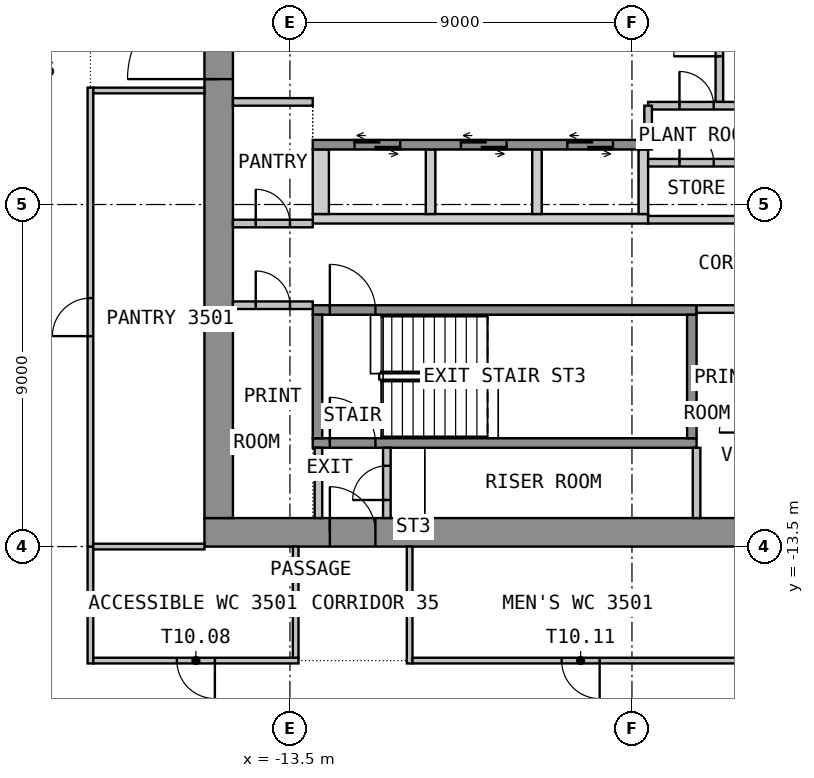
"""IFC4 building model, lengths in metres.
Left out: names, types, materials, properties, quantities, classifications, styles, units other than length and angle.
Written with IfcOpenShell. Run it as: python <this file> out.ifc"""

import sys

from ifc_helpers import new_model, si_unit, direction, frame, frame_2d, origin, place, context, subcontext, project, spatial, polyline, rectangle, outline, extrude, element, fill, save


model = new_model("IFC4")
c1 = context("Model", 3, precision=1e-05, world=origin(), true_north=direction((0.0, 1.0)))
c2 = subcontext(c1, "Body", "Model", "MODEL_VIEW")
j1 = project(units=[si_unit("LENGTHUNIT", "METRE"), si_unit("PLANEANGLEUNIT", "RADIAN")], contexts=[c1])
p1 = place(None, origin())
s1 = spatial("IfcSite", under=j1, at=p1, CompositionType="ELEMENT")
p2 = place(p1, origin())
s2 = spatial("IfcBuilding", under=s1, at=p2, CompositionType="ELEMENT")
p3 = place(p2, frame((0.0, 0.0, 144.3)))
s3 = spatial("IfcBuildingStorey", under=s2, at=p3, CompositionType="ELEMENT", Elevation=144.3)
p4 = place(p3, frame((-15.75, -13.125, 0.0), z_axis=(0.0, 0.0, 1.0), x_axis=(1.0, 0.0, 0.0)))
e1 = element("IfcWall", 1, at=p4, inside=s3, PredefinedType="SHEAR", context=c2, shape_type="SweptSolid", body=[
    extrude(rectangle(XDim=31.5, YDim=0.75, at=frame_2d((15.75, 0.0))), origin(), (0.0, 0.0, 1.0), 3.575),
])
p5 = place(p4, frame((14.55, 0.0, 0.0)))
e2 = element("IfcOpeningElement", 2, at=p5, cuts=e1, PredefinedType="OPENING", context=c2, shape_type="SweptSolid", body=[
    extrude(rectangle(XDim=2.4, YDim=2.1, at=frame_2d((1.2, 1.05))), frame((0.0, 0.385, 0.0), z_axis=(0.0, -1.0, 0.0), x_axis=(1.0, 0.0, 0.0)), (0.0, 0.0, 1.0), 0.77),
])
p6 = place(p4, frame((3.3, 0.0, 0.0)))
e3 = element("IfcOpeningElement", 3, at=p6, cuts=e1, PredefinedType="OPENING", context=c2, shape_type="SweptSolid", body=[
    extrude(rectangle(XDim=1.2, YDim=2.1, at=frame_2d((0.6, 1.05))), frame((0.0, 0.385, 0.0), z_axis=(0.0, -1.0, 0.0), x_axis=(1.0, 0.0, 0.0)), (0.0, 0.0, 1.0), 0.77),
])
p7 = place(p4, frame((27.0, 0.0, 0.0)))
e4 = element("IfcOpeningElement", 4, at=p7, cuts=e1, PredefinedType="OPENING", context=c2, shape_type="SweptSolid", body=[
    extrude(rectangle(XDim=1.2, YDim=2.1, at=frame_2d((0.6, 1.05))), frame((0.0, 0.385, 0.0), z_axis=(0.0, -1.0, 0.0), x_axis=(1.0, 0.0, 0.0)), (0.0, 0.0, 1.0), 0.77),
])
p8 = place(p3, frame((-15.375, -12.75, 0.0), z_axis=(0.0, 0.0, 1.0), x_axis=(0.0, 1.0, 0.0)))
e5 = element("IfcWall", 5, at=p8, inside=s3, PredefinedType="SHEAR", context=c2, shape_type="SweptSolid", body=[
    extrude(rectangle(XDim=25.5, YDim=0.75, at=frame_2d((12.75, 0.0))), origin(), (0.0, 0.0, 1.0), 3.575),
])
p9 = place(p8, frame((11.55, 0.0, 0.0)))
e6 = element("IfcOpeningElement", 6, at=p9, cuts=e5, PredefinedType="OPENING", context=c2, shape_type="SweptSolid", body=[
    extrude(rectangle(XDim=2.4, YDim=2.1, at=frame_2d((1.2, 1.05))), frame((0.0, 0.385, 0.0), z_axis=(0.0, -1.0, 0.0), x_axis=(1.0, 0.0, 0.0)), (0.0, 0.0, 1.0), 0.77),
])
p10 = place(p3, origin())
e7 = element("IfcWall", 7, at=p10, inside=s3, PredefinedType="SHEAR", context=c2, shape_type="SweptSolid", body=[
    extrude(outline(polyline([(-12.9, -5.0), (-4.075, -5.0), (-4.075, -4.75), (-12.9, -4.75), (-12.9, -5.0)])), origin(), (0.0, 0.0, 1.0), 3.575),
])
p11 = place(p3, origin())
e8 = element("IfcWall", 8, at=p11, inside=s3, PredefinedType="SHEAR", context=c2, shape_type="SweptSolid", body=[
    extrude(outline(polyline([(-12.9, -4.75), (-12.475, -4.75), (-12.475, -3.05), (-12.9, -3.05), (-12.9, -4.75)])), origin(), (0.0, 0.0, 1.0), 3.575),
])
p12 = place(p3, origin())
e9 = element("IfcWall", 9, at=p12, inside=s3, PredefinedType="SHEAR", context=c2, shape_type="SweptSolid", body=[
    extrude(outline(polyline([(-9.925, -4.75), (-9.675, -4.75), (-9.675, -3.05), (-9.925, -3.05), (-9.925, -4.75)])), origin(), (0.0, 0.0, 1.0), 3.575),
])
p13 = place(p3, origin())
e10 = element("IfcWall", 10, at=p13, inside=s3, PredefinedType="SHEAR", context=c2, shape_type="SweptSolid", body=[
    extrude(outline(polyline([(-7.125, -4.75), (-6.875, -4.75), (-6.875, -3.05), (-7.125, -3.05), (-7.125, -4.75)])), origin(), (0.0, 0.0, 1.0), 3.575),
])
p14 = place(p3, origin())
e11 = element("IfcWall", 11, at=p14, inside=s3, PredefinedType="SHEAR", context=c2, shape_type="SweptSolid", body=[
    extrude(outline(polyline([(-4.325, -4.75), (-4.075, -4.75), (-4.075, -3.05), (-4.325, -3.05), (-4.325, -4.75)])), origin(), (0.0, 0.0, 1.0), 3.575),
])
p15 = place(p3, frame((-12.9, -2.925, 0.0), z_axis=(0.0, 0.0, 1.0), x_axis=(1.0, 0.0, 0.0)))
e12 = element("IfcWall", 12, at=p15, inside=s3, PredefinedType="SHEAR", context=c2, shape_type="SweptSolid", body=[
    extrude(rectangle(XDim=8.825, YDim=0.25, at=frame_2d((4.413, 0.0))), origin(), (0.0, 0.0, 1.0), 3.575),
])
p16 = place(p15, frame((1.1, 0.0, 0.0)))
e13 = element("IfcOpeningElement", 13, at=p16, cuts=e12, PredefinedType="OPENING", context=c2, shape_type="SweptSolid", body=[
    extrude(rectangle(XDim=1.2, YDim=2.1, at=frame_2d((0.6, 1.05))), frame((0.0, 0.135, 0.0), z_axis=(0.0, -1.0, 0.0), x_axis=(1.0, 0.0, 0.0)), (0.0, 0.0, 1.0), 0.27),
])
p17 = place(p15, frame((3.9, 0.0, 0.0)))
e14 = element("IfcOpeningElement", 14, at=p17, cuts=e12, PredefinedType="OPENING", context=c2, shape_type="SweptSolid", body=[
    extrude(rectangle(XDim=1.2, YDim=2.1, at=frame_2d((0.6, 1.05))), frame((0.0, 0.135, 0.0), z_axis=(0.0, -1.0, 0.0), x_axis=(1.0, 0.0, 0.0)), (0.0, 0.0, 1.0), 0.27),
])
p18 = place(p15, frame((6.7, 0.0, 0.0)))
e15 = element("IfcOpeningElement", 15, at=p18, cuts=e12, PredefinedType="OPENING", context=c2, shape_type="SweptSolid", body=[
    extrude(rectangle(XDim=1.2, YDim=2.1, at=frame_2d((0.6, 1.05))), frame((0.0, 0.135, 0.0), z_axis=(0.0, -1.0, 0.0), x_axis=(1.0, 0.0, 0.0)), (0.0, 0.0, 1.0), 0.27),
])
p19 = place(p3, frame((-2.2, -1.8, 0.0), z_axis=(0.0, 0.0, 1.0), x_axis=(0.0, 1.0, 0.0)))
e16 = element("IfcWall", 16, at=p19, inside=s3, PredefinedType="PARTITIONING", context=c2, shape_type="SweptSolid", body=[
    extrude(rectangle(XDim=3.6, YDim=0.2, at=frame_2d((1.8, 0.0))), origin(), (0.0, 0.0, 1.0), 3.575),
])
p20 = place(p19, frame((1.2, 0.0, 0.0)))
e17 = element("IfcOpeningElement", 17, at=p20, cuts=e16, PredefinedType="OPENING", context=c2, shape_type="SweptSolid", body=[
    extrude(rectangle(XDim=1.2, YDim=2.1, at=frame_2d((0.6, 1.05))), frame((0.0, 0.11, 0.0), z_axis=(0.0, -1.0, 0.0), x_axis=(1.0, 0.0, 0.0)), (0.0, 0.0, 1.0), 0.22),
])
p21 = place(p3, frame((-12.9, -10.775, 0.0), z_axis=(0.0, 0.0, 1.0), x_axis=(1.0, 0.0, 0.0)))
e18 = element("IfcWall", 18, at=p21, inside=s3, PredefinedType="SHEAR", context=c2, shape_type="SweptSolid", body=[
    extrude(rectangle(XDim=10.1, YDim=0.25, at=frame_2d((5.05, 0.0))), origin(), (0.0, 0.0, 1.0), 3.575),
])
p22 = place(p21, frame((0.45, 0.0, 0.0)))
e19 = element("IfcOpeningElement", 19, at=p22, cuts=e18, PredefinedType="OPENING", context=c2, shape_type="SweptSolid", body=[
    extrude(rectangle(XDim=1.2, YDim=2.1, at=frame_2d((0.6, 1.05))), frame((0.0, 0.135, 0.0), z_axis=(0.0, -1.0, 0.0), x_axis=(1.0, 0.0, 0.0)), (0.0, 0.0, 1.0), 0.27),
])
p23 = place(p3, frame((-12.9, -7.275, 0.0), z_axis=(0.0, 0.0, 1.0), x_axis=(1.0, 0.0, 0.0)))
e20 = element("IfcWall", 20, at=p23, inside=s3, PredefinedType="SHEAR", context=c2, shape_type="SweptSolid", body=[
    extrude(rectangle(XDim=10.1, YDim=0.25, at=frame_2d((5.05, 0.0))), origin(), (0.0, 0.0, 1.0), 3.575),
])
p24 = place(p23, frame((0.45, 0.0, 0.0)))
e21 = element("IfcOpeningElement", 21, at=p24, cuts=e20, PredefinedType="OPENING", context=c2, shape_type="SweptSolid", body=[
    extrude(rectangle(XDim=1.2, YDim=2.1, at=frame_2d((0.6, 1.05))), frame((0.0, 0.135, 0.0), z_axis=(0.0, -1.0, 0.0), x_axis=(1.0, 0.0, 0.0)), (0.0, 0.0, 1.0), 0.27),
])
for number, where, z_axis, x_axis in (
    (22, (-12.775, -10.65, 0.0), (0.0, 0.0, 1.0), (0.0, 1.0, 0.0)),
    (23, (-2.925, -10.65, 0.0), (0.0, 0.0, 1.0), (0.0, 1.0, 0.0)),
):
    element("IfcWall", number, at=place(p3, frame(where, z_axis=z_axis, x_axis=x_axis)), inside=s3, PredefinedType="SHEAR", context=c2, shape_type="SweptSolid", body=[
        extrude(rectangle(XDim=3.25, YDim=0.25, at=frame_2d((1.625, 0.0))), origin(), (0.0, 0.0, 1.0), 3.575),
    ])
p25 = place(p3, frame((-2.8, -7.25, 0.0), z_axis=(0.0, 0.0, 1.0), x_axis=(1.0, 0.0, 0.0)))
e24 = element("IfcWall", 24, at=p25, inside=s3, PredefinedType="PARTITIONING", context=c2, shape_type="SweptSolid", body=[
    extrude(rectangle(XDim=1.4, YDim=0.2, at=frame_2d((0.7, 0.0))), origin(), (0.0, 0.0, 1.0), 3.575),
])
p26 = place(p3, frame((-12.75, -12.75, 0.0), z_axis=(0.0, 0.0, 1.0), x_axis=(0.0, 1.0, 0.0)))
e25 = element("IfcWall", 25, at=p26, inside=s3, PredefinedType="PARTITIONING", context=c2, shape_type="SweptSolid", body=[
    extrude(rectangle(XDim=1.85, YDim=0.2, at=frame_2d((0.925, 0.0))), origin(), (0.0, 0.0, 1.0), 3.575),
])
p27 = place(p3, frame((-10.95, -12.75, 0.0), z_axis=(0.0, 0.0, 1.0), x_axis=(0.0, 1.0, 0.0)))
e26 = element("IfcWall", 26, at=p27, inside=s3, PredefinedType="PARTITIONING", context=c2, shape_type="SweptSolid", body=[
    extrude(rectangle(XDim=1.85, YDim=0.2, at=frame_2d((0.925, 0.0))), origin(), (0.0, 0.0, 1.0), 3.575),
])
p28 = place(p27, frame((0.475, 0.0, 0.0)))
e27 = element("IfcOpeningElement", 27, at=p28, cuts=e26, PredefinedType="OPENING", context=c2, shape_type="SweptSolid", body=[
    extrude(rectangle(XDim=0.9, YDim=2.1, at=frame_2d((0.45, 1.05))), frame((0.0, 0.11, 0.0), z_axis=(0.0, -1.0, 0.0), x_axis=(1.0, 0.0, 0.0)), (0.0, 0.0, 1.0), 0.22),
])
p29 = place(p3, frame((-15.0, -7.15, 0.0), z_axis=(0.0, 0.0, 1.0), x_axis=(1.0, 0.0, 0.0)))
e28 = element("IfcWall", 28, at=p29, inside=s3, PredefinedType="PARTITIONING", context=c2, shape_type="SweptSolid", body=[
    extrude(rectangle(XDim=2.1, YDim=0.2, at=frame_2d((1.05, 0.0))), origin(), (0.0, 0.0, 1.0), 3.575),
])
p30 = place(p29, frame((0.6, 0.0, 0.0)))
e29 = element("IfcOpeningElement", 29, at=p30, cuts=e28, PredefinedType="OPENING", context=c2, shape_type="SweptSolid", body=[
    extrude(rectangle(XDim=0.9, YDim=2.1, at=frame_2d((0.45, 1.05))), frame((0.0, 0.11, 0.0), z_axis=(0.0, -1.0, 0.0), x_axis=(1.0, 0.0, 0.0)), (0.0, 0.0, 1.0), 0.22),
])
p31 = place(p3, frame((-15.0, -5.0, 0.0), z_axis=(0.0, 0.0, 1.0), x_axis=(1.0, 0.0, 0.0)))
e30 = element("IfcWall", 30, at=p31, inside=s3, PredefinedType="PARTITIONING", context=c2, shape_type="SweptSolid", body=[
    extrude(rectangle(XDim=2.1, YDim=0.2, at=frame_2d((1.05, 0.0))), origin(), (0.0, 0.0, 1.0), 3.575),
])
p32 = place(p31, frame((0.6, 0.0, 0.0)))
e31 = element("IfcOpeningElement", 31, at=p32, cuts=e30, PredefinedType="OPENING", context=c2, shape_type="SweptSolid", body=[
    extrude(rectangle(XDim=0.9, YDim=2.1, at=frame_2d((0.45, 1.05))), frame((0.0, 0.11, 0.0), z_axis=(0.0, -1.0, 0.0), x_axis=(1.0, 0.0, 0.0)), (0.0, 0.0, 1.0), 0.22),
])
p33 = place(p3, frame((-15.0, -1.8, 0.0), z_axis=(0.0, 0.0, 1.0), x_axis=(1.0, 0.0, 0.0)))
e32 = element("IfcWall", 32, at=p33, inside=s3, PredefinedType="PARTITIONING", context=c2, shape_type="SweptSolid", body=[
    extrude(rectangle(XDim=2.1, YDim=0.2, at=frame_2d((1.05, 0.0))), origin(), (0.0, 0.0, 1.0), 3.575),
])
p34 = place(p3, frame((-4.075, -3.4, 0.0), z_axis=(0.0, 0.0, 1.0), x_axis=(1.0, 0.0, 0.0)))
e33 = element("IfcWall", 33, at=p34, inside=s3, PredefinedType="PARTITIONING", context=c2, shape_type="SweptSolid", body=[
    extrude(rectangle(XDim=2.55, YDim=0.2, at=frame_2d((1.275, 0.0))), origin(), (0.0, 0.0, 1.0), 3.575),
])
p35 = place(p34, frame((0.825, 0.0, 0.0)))
e34 = element("IfcOpeningElement", 34, at=p35, cuts=e33, PredefinedType="OPENING", context=c2, shape_type="SweptSolid", body=[
    extrude(rectangle(XDim=0.9, YDim=2.1, at=frame_2d((0.45, 1.05))), frame((0.0, 0.11, 0.0), z_axis=(0.0, -1.0, 0.0), x_axis=(1.0, 0.0, 0.0)), (0.0, 0.0, 1.0), 0.22),
])
p36 = place(p3, frame((-4.075, -1.9, 0.0), z_axis=(0.0, 0.0, 1.0), x_axis=(1.0, 0.0, 0.0)))
e35 = element("IfcWall", 35, at=p36, inside=s3, PredefinedType="PARTITIONING", context=c2, shape_type="SweptSolid", body=[
    extrude(rectangle(XDim=2.55, YDim=0.2, at=frame_2d((1.275, 0.0))), origin(), (0.0, 0.0, 1.0), 3.575),
])
p37 = place(p36, frame((0.825, 0.0, 0.0)))
e36 = element("IfcOpeningElement", 36, at=p37, cuts=e35, PredefinedType="OPENING", context=c2, shape_type="SweptSolid", body=[
    extrude(rectangle(XDim=0.9, YDim=2.1, at=frame_2d((0.45, 1.05))), frame((0.0, 0.11, 0.0), z_axis=(0.0, -1.0, 0.0), x_axis=(1.0, 0.0, 0.0)), (0.0, 0.0, 1.0), 0.22),
])
p38 = place(p3, frame((-4.075, -4.9, 0.0), z_axis=(0.0, 0.0, 1.0), x_axis=(1.0, 0.0, 0.0)))
e37 = element("IfcWall", 37, at=p38, inside=s3, PredefinedType="PARTITIONING", context=c2, shape_type="SweptSolid", body=[
    extrude(rectangle(XDim=2.55, YDim=0.2, at=frame_2d((1.275, 0.0))), origin(), (0.0, 0.0, 1.0), 3.575),
])
p39 = place(p3, frame((-4.075, -1.9, 0.0), z_axis=(0.0, 0.0, 1.0), x_axis=(0.0, -1.0, 0.0)))
e38 = element("IfcWall", 38, at=p39, inside=s3, PredefinedType="PARTITIONING", context=c2, shape_type="SweptSolid", body=[
    extrude(rectangle(XDim=1.15, YDim=0.2, at=frame_2d((0.575, 0.0))), origin(), (0.0, 0.0, 1.0), 3.575),
])
p40 = place(p3, frame((-18.75, -16.575, 0.0), z_axis=(0.0, 0.0, 1.0), x_axis=(0.0, 1.0, 0.0)))
e39 = element("IfcWall", 39, at=p40, inside=s3, PredefinedType="PARTITIONING", context=c2, shape_type="SweptSolid", body=[
    extrude(rectangle(XDim=3.075, YDim=0.15, at=frame_2d((1.538, 0.0))), origin(), (0.0, 0.0, 1.0), 3.575),
])
p41 = place(p3, frame((-13.275, -16.5, 0.0), z_axis=(0.0, 0.0, 1.0), x_axis=(-1.0, 0.0, 0.0)))
e40 = element("IfcWall", 40, at=p41, inside=s3, PredefinedType="PARTITIONING", context=c2, shape_type="SweptSolid", body=[
    extrude(rectangle(XDim=5.4, YDim=0.15, at=frame_2d((2.7, 0.0))), origin(), (0.0, 0.0, 1.0), 3.575),
])
p42 = place(p41, frame((2.2, 0.0, 0.0)))
e41 = element("IfcOpeningElement", 41, at=p42, cuts=e40, PredefinedType="OPENING", context=c2, shape_type="SweptSolid", body=[
    extrude(rectangle(XDim=1.0, YDim=2.1, at=frame_2d((0.5, 1.05))), frame((0.0, 0.085, 0.0), z_axis=(0.0, -1.0, 0.0), x_axis=(1.0, 0.0, 0.0)), (0.0, 0.0, 1.0), 0.17),
])
p43 = place(p3, frame((-18.75, -13.5, 0.0), z_axis=(0.0, 0.0, 1.0), x_axis=(0.0, 1.0, 0.0)))
e42 = element("IfcWall", 42, at=p43, inside=s3, PredefinedType="PARTITIONING", context=c2, shape_type="SweptSolid", body=[
    extrude(rectangle(XDim=12.075, YDim=0.15, at=frame_2d((6.038, 0.0))), origin(), (0.0, 0.0, 1.0), 3.575),
])
p44 = place(p43, frame((5.538, 0.0, 0.0)))
e43 = element("IfcOpeningElement", 43, at=p44, cuts=e42, PredefinedType="OPENING", context=c2, shape_type="SweptSolid", body=[
    extrude(rectangle(XDim=1.0, YDim=2.1, at=frame_2d((0.5, 1.05))), frame((0.0, 0.085, 0.0), z_axis=(0.0, -1.0, 0.0), x_axis=(1.0, 0.0, 0.0)), (0.0, 0.0, 1.0), 0.17),
])
for number, where, z_axis, x_axis in (
    (44, (-15.75, -13.5, 0.0), (0.0, 0.0, 1.0), (-1.0, 0.0, 0.0)),
    (45, (-18.675, -1.5, 0.0), (0.0, 0.0, 1.0), (1.0, 0.0, 0.0)),
    (46, (-13.35, -13.5, 0.0), (0.0, 0.0, 1.0), (0.0, -1.0, 0.0)),
):
    element("IfcWall", number, at=place(p3, frame(where, z_axis=z_axis, x_axis=x_axis)), inside=s3, PredefinedType="PARTITIONING", context=c2, shape_type="SweptSolid", body=[
        extrude(rectangle(XDim=2.925, YDim=0.15, at=frame_2d((1.462, 0.0))), origin(), (0.0, 0.0, 1.0), 3.575),
    ])
p45 = place(p3, frame((-10.35, -16.575, 0.0), z_axis=(0.0, 0.0, 1.0), x_axis=(0.0, 1.0, 0.0)))
e47 = element("IfcWall", 47, at=p45, inside=s3, PredefinedType="PARTITIONING", context=c2, shape_type="SweptSolid", body=[
    extrude(rectangle(XDim=3.075, YDim=0.15, at=frame_2d((1.538, 0.0))), origin(), (0.0, 0.0, 1.0), 3.575),
])
p46 = place(p3, frame((-1.425, -16.5, 0.0), z_axis=(0.0, 0.0, 1.0), x_axis=(-1.0, 0.0, 0.0)))
e48 = element("IfcWall", 48, at=p46, inside=s3, PredefinedType="PARTITIONING", context=c2, shape_type="SweptSolid", body=[
    extrude(rectangle(XDim=8.85, YDim=0.15, at=frame_2d((4.425, 0.0))), origin(), (0.0, 0.0, 1.0), 3.575),
])
p47 = place(p46, frame((3.925, 0.0, 0.0)))
e49 = element("IfcOpeningElement", 49, at=p47, cuts=e48, PredefinedType="OPENING", context=c2, shape_type="SweptSolid", body=[
    extrude(rectangle(XDim=1.0, YDim=2.1, at=frame_2d((0.5, 1.05))), frame((0.0, 0.085, 0.0), z_axis=(0.0, -1.0, 0.0), x_axis=(1.0, 0.0, 0.0)), (0.0, 0.0, 1.0), 0.17),
])
p48 = place(p3, frame((-2.8, -12.749, 0.0), z_axis=(0.0, 0.0, 1.0), x_axis=(0.0, 1.0, 0.0)))
e50 = element("IfcWall", 50, at=p48, inside=s3, PredefinedType="PARTITIONING", context=c2, shape_type="SweptSolid", body=[
    extrude(rectangle(XDim=1.848, YDim=0.2, at=frame_2d((0.924, 0.0))), origin(), (0.0, 0.0, 1.0), 3.575),
])
p49 = place(p9, origin())
e51 = element("IfcDoor", 51, at=p49, inside=s3, OperationType="DOUBLE_DOOR_DOUBLE_SWING", PredefinedType="DOOR", context=c2, shape_type="SweptSolid", body=[
    extrude(rectangle(XDim=2.4, YDim=2.1, at=frame_2d((1.2, 1.05))), frame((0.0, 0.025, 0.0), z_axis=(0.0, -1.0, 0.0), x_axis=(1.0, 0.0, 0.0)), (0.0, 0.0, 1.0), 0.05),
])
fill(e6, e51)
p50 = place(p6, origin())
e52 = element("IfcDoor", 52, at=p50, inside=s3, OperationType="SINGLE_SWING_RIGHT", PredefinedType="DOOR", context=c2, shape_type="SweptSolid", body=[
    extrude(rectangle(XDim=1.2, YDim=2.1, at=frame_2d((0.6, 1.05))), frame((0.0, 0.025, 0.0), z_axis=(0.0, -1.0, 0.0), x_axis=(1.0, 0.0, 0.0)), (0.0, 0.0, 1.0), 0.05),
])
fill(e3, e52)
p51 = place(p16, origin())
e53 = element("IfcDoor", 53, at=p51, inside=s3, OperationType="DOUBLE_DOOR_SLIDING", PredefinedType="DOOR", context=c2, shape_type="SweptSolid", body=[
    extrude(rectangle(XDim=1.2, YDim=2.1, at=frame_2d((0.6, 1.05))), frame((0.0, 0.025, 0.0), z_axis=(0.0, -1.0, 0.0), x_axis=(1.0, 0.0, 0.0)), (0.0, 0.0, 1.0), 0.05),
])
fill(e13, e53)
p52 = place(p17, origin())
e54 = element("IfcDoor", 54, at=p52, inside=s3, OperationType="DOUBLE_DOOR_SLIDING", PredefinedType="DOOR", context=c2, shape_type="SweptSolid", body=[
    extrude(rectangle(XDim=1.2, YDim=2.1, at=frame_2d((0.6, 1.05))), frame((0.0, 0.025, 0.0), z_axis=(0.0, -1.0, 0.0), x_axis=(1.0, 0.0, 0.0)), (0.0, 0.0, 1.0), 0.05),
])
fill(e14, e54)
p53 = place(p18, origin())
e55 = element("IfcDoor", 55, at=p53, inside=s3, OperationType="DOUBLE_DOOR_SLIDING", PredefinedType="DOOR", context=c2, shape_type="SweptSolid", body=[
    extrude(rectangle(XDim=1.2, YDim=2.1, at=frame_2d((0.6, 1.05))), frame((0.0, 0.025, 0.0), z_axis=(0.0, -1.0, 0.0), x_axis=(1.0, 0.0, 0.0)), (0.0, 0.0, 1.0), 0.05),
])
fill(e15, e55)
p54 = place(p20, origin())
e56 = element("IfcDoor", 56, at=p54, inside=s3, OperationType="SINGLE_SWING_LEFT", PredefinedType="DOOR", context=c2, shape_type="SweptSolid", body=[
    extrude(rectangle(XDim=1.2, YDim=2.1, at=frame_2d((0.6, 1.05))), frame((0.0, 0.025, 0.0), z_axis=(0.0, -1.0, 0.0), x_axis=(1.0, 0.0, 0.0)), (0.0, 0.0, 1.0), 0.05),
])
fill(e17, e56)
p55 = place(p24, origin())
e57 = element("IfcDoor", 57, at=p55, inside=s3, OperationType="SINGLE_SWING_LEFT", PredefinedType="DOOR", context=c2, shape_type="SweptSolid", body=[
    extrude(rectangle(XDim=1.2, YDim=2.1, at=frame_2d((0.6, 1.05))), frame((0.0, 0.025, 0.0), z_axis=(0.0, -1.0, 0.0), x_axis=(1.0, 0.0, 0.0)), (0.0, 0.0, 1.0), 0.05),
])
fill(e21, e57)
p56 = place(p22, origin())
e58 = element("IfcDoor", 58, at=p56, inside=s3, OperationType="SINGLE_SWING_RIGHT", PredefinedType="DOOR", context=c2, shape_type="SweptSolid", body=[
    extrude(rectangle(XDim=1.2, YDim=2.1, at=frame_2d((0.6, 1.05))), frame((0.0, 0.025, 0.0), z_axis=(0.0, -1.0, 0.0), x_axis=(1.0, 0.0, 0.0)), (0.0, 0.0, 1.0), 0.05),
])
fill(e19, e58)
p57 = place(p28, origin())
e59 = element("IfcDoor", 59, at=p57, inside=s3, OperationType="SINGLE_SWING_LEFT", PredefinedType="DOOR", context=c2, shape_type="SweptSolid", body=[
    extrude(rectangle(XDim=0.9, YDim=2.1, at=frame_2d((0.45, 1.05))), frame((0.0, 0.025, 0.0), z_axis=(0.0, -1.0, 0.0), x_axis=(1.0, 0.0, 0.0)), (0.0, 0.0, 1.0), 0.05),
])
fill(e27, e59)
p58 = place(p30, origin())
e60 = element("IfcDoor", 60, at=p58, inside=s3, OperationType="SINGLE_SWING_LEFT", PredefinedType="DOOR", context=c2, shape_type="SweptSolid", body=[
    extrude(rectangle(XDim=0.9, YDim=2.1, at=frame_2d((0.45, 1.05))), frame((0.0, 0.025, 0.0), z_axis=(0.0, -1.0, 0.0), x_axis=(1.0, 0.0, 0.0)), (0.0, 0.0, 1.0), 0.05),
])
fill(e29, e60)
p59 = place(p32, origin())
e61 = element("IfcDoor", 61, at=p59, inside=s3, OperationType="SINGLE_SWING_LEFT", PredefinedType="DOOR", context=c2, shape_type="SweptSolid", body=[
    extrude(rectangle(XDim=0.9, YDim=2.1, at=frame_2d((0.45, 1.05))), frame((0.0, 0.025, 0.0), z_axis=(0.0, -1.0, 0.0), x_axis=(1.0, 0.0, 0.0)), (0.0, 0.0, 1.0), 0.05),
])
fill(e31, e61)
p60 = place(p35, origin())
e62 = element("IfcDoor", 62, at=p60, inside=s3, OperationType="SINGLE_SWING_LEFT", PredefinedType="DOOR", context=c2, shape_type="SweptSolid", body=[
    extrude(rectangle(XDim=0.9, YDim=2.1, at=frame_2d((0.45, 1.05))), frame((0.0, 0.025, 0.0), z_axis=(0.0, -1.0, 0.0), x_axis=(1.0, 0.0, 0.0)), (0.0, 0.0, 1.0), 0.05),
])
fill(e34, e62)
p61 = place(p37, origin())
e63 = element("IfcDoor", 63, at=p61, inside=s3, OperationType="SINGLE_SWING_LEFT", PredefinedType="DOOR", context=c2, shape_type="SweptSolid", body=[
    extrude(rectangle(XDim=0.9, YDim=2.1, at=frame_2d((0.45, 1.05))), frame((0.0, 0.025, 0.0), z_axis=(0.0, -1.0, 0.0), x_axis=(1.0, 0.0, 0.0)), (0.0, 0.0, 1.0), 0.05),
])
fill(e36, e63)
p62 = place(p44, origin())
e64 = element("IfcDoor", 64, at=p62, inside=s3, OperationType="SINGLE_SWING_LEFT", PredefinedType="DOOR", context=c2, shape_type="SweptSolid", body=[
    extrude(rectangle(XDim=1.0, YDim=2.1, at=frame_2d((0.5, 1.05))), frame((0.0, 0.025, 0.0), z_axis=(0.0, -1.0, 0.0), x_axis=(1.0, 0.0, 0.0)), (0.0, 0.0, 1.0), 0.05),
])
fill(e43, e64)
p63 = place(p42, origin())
e65 = element("IfcDoor", 65, at=p63, inside=s3, OperationType="SINGLE_SWING_RIGHT", PredefinedType="DOOR", context=c2, shape_type="SweptSolid", body=[
    extrude(rectangle(XDim=1.0, YDim=2.1, at=frame_2d((0.5, 1.05))), frame((0.0, 0.025, 0.0), z_axis=(0.0, -1.0, 0.0), x_axis=(1.0, 0.0, 0.0)), (0.0, 0.0, 1.0), 0.05),
])
fill(e41, e65)
p64 = place(p47, origin())
e66 = element("IfcDoor", 66, at=p64, inside=s3, OperationType="SINGLE_SWING_RIGHT", PredefinedType="DOOR", context=c2, shape_type="SweptSolid", body=[
    extrude(rectangle(XDim=1.0, YDim=2.1, at=frame_2d((0.5, 1.05))), frame((0.0, 0.025, 0.0), z_axis=(0.0, -1.0, 0.0), x_axis=(1.0, 0.0, 0.0)), (0.0, 0.0, 1.0), 0.05),
])
fill(e49, e66)
save(model, sys.argv[1])
